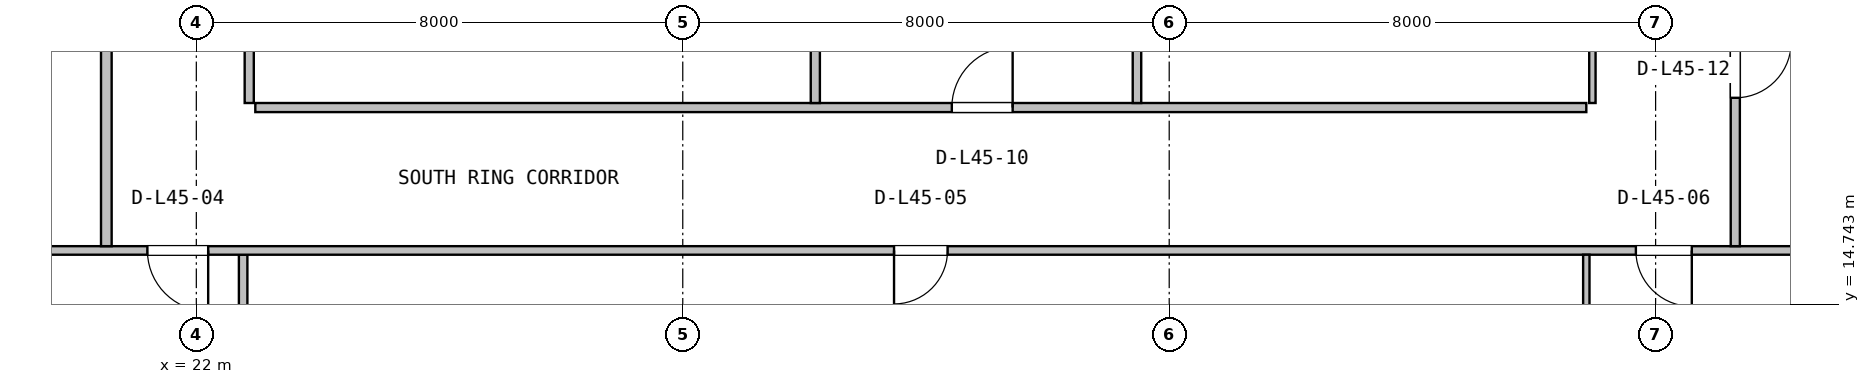
"""IFC4 building model, lengths in metres.
Left out: names, types, materials, properties, quantities, classifications, styles, units other than length and angle.
Written with IfcOpenShell. Run it as: python <this file> out.ifc"""

import sys

from ifc_helpers import new_model, si_unit, direction, frame, frame_2d, origin, place, context, subcontext, project, spatial, rectangle, extrude, source, transform, mapped, element, fill, save


model = new_model("IFC4")
c1 = context("Model", 3, precision=1e-05, world=origin(), true_north=direction((0.0, 1.0)))
c2 = subcontext(c1, "Body", "Model", "MODEL_VIEW")
j1 = project(units=[si_unit("LENGTHUNIT", "METRE"), si_unit("PLANEANGLEUNIT", "RADIAN")], contexts=[c1])
p1 = place(None, origin())
s1 = spatial("IfcSite", under=j1, at=p1, CompositionType="ELEMENT")
p2 = place(p1, origin())
s2 = spatial("IfcBuilding", under=s1, at=p2, CompositionType="ELEMENT")
p3 = place(p2, frame((0.0, 0.0, 183.8)))
s3 = spatial("IfcBuildingStorey", under=s2, at=p3, CompositionType="ELEMENT", Elevation=183.8)
p4 = place(p3, frame((22.77, 7.38, 0.0), z_axis=(0.0, 0.0, 1.0), x_axis=(0.0, 1.0, 0.0)))
e1 = element("IfcWall", 1, at=p4, inside=s3, PredefinedType="PARTITIONING", context=c2, shape_type="SweptSolid", body=[
    extrude(rectangle(XDim=8.18, YDim=0.14, at=frame_2d((4.09, 0.0))), origin(), (0.0, 0.0, 1.0), 3.108),
])
p5 = place(p3, frame((7.18, 15.63, 0.0), z_axis=(0.0, 0.0, 1.0), x_axis=(1.0, 0.0, 0.0)))
e2 = element("IfcWall", 2, at=p5, inside=s3, PredefinedType="PARTITIONING", context=c2, shape_type="SweptSolid", body=[
    extrude(rectangle(XDim=53.64, YDim=0.14, at=frame_2d((26.82, 0.0))), origin(), (0.0, 0.0, 1.0), 2.909),
])
p6 = place(p5, frame((14.015, 0.0, 0.0)))
e3 = element("IfcOpeningElement", 3, at=p6, cuts=e2, PredefinedType="OPENING", context=c2, shape_type="SweptSolid", body=[
    extrude(rectangle(XDim=1.0, YDim=2.1, at=frame_2d((0.5, 1.05))), frame((0.0, 0.08, 0.0), z_axis=(0.0, -1.0, 0.0), x_axis=(1.0, 0.0, 0.0)), (0.0, 0.0, 1.0), 0.16),
])
p7 = place(p5, frame((26.295, 0.0, 0.0)))
e4 = element("IfcOpeningElement", 4, at=p7, cuts=e2, PredefinedType="OPENING", context=c2, shape_type="SweptSolid", body=[
    extrude(rectangle(XDim=0.88, YDim=2.06, at=frame_2d((0.44, 1.03))), frame((0.0, 0.08, 0.0), z_axis=(0.0, -1.0, 0.0), x_axis=(1.0, 0.0, 0.0)), (0.0, 0.0, 1.0), 0.16),
])
p8 = place(p5, frame((38.495, 0.0, 0.0)))
e5 = element("IfcOpeningElement", 5, at=p8, cuts=e2, PredefinedType="OPENING", context=c2, shape_type="SweptSolid", body=[
    extrude(rectangle(XDim=0.92, YDim=2.08, at=frame_2d((0.46, 1.04))), frame((0.0, 0.08, 0.0), z_axis=(0.0, -1.0, 0.0), x_axis=(1.0, 0.0, 0.0)), (0.0, 0.0, 1.0), 0.16),
])
p9 = place(p3, frame((44.86, 7.38, 0.0), z_axis=(0.0, 0.0, 1.0), x_axis=(0.0, 1.0, 0.0)))
e6 = element("IfcWall", 6, at=p9, inside=s3, PredefinedType="PARTITIONING", context=c2, shape_type="SweptSolid", body=[
    extrude(rectangle(XDim=8.18, YDim=0.105, at=frame_2d((4.09, 0.0))), origin(), (0.0, 0.0, 1.0), 3.108),
])
p10 = place(p3, frame((20.52, 15.7, 0.0), z_axis=(0.0, 0.0, 1.0), x_axis=(0.0, 1.0, 0.0)))
e7 = element("IfcWall", 7, at=p10, inside=s3, PredefinedType="PARTITIONING", context=c2, shape_type="SweptSolid", body=[
    extrude(rectangle(XDim=17.575, YDim=0.175, at=frame_2d((8.788, 0.0))), origin(), (0.0, 0.0, 1.0), 3.222),
])
p11 = place(p10, frame((8.265, 0.0, 0.0)))
e8 = element("IfcOpeningElement", 8, at=p11, cuts=e7, PredefinedType="OPENING", context=c2, shape_type="SweptSolid", body=[
    extrude(rectangle(XDim=1.05, YDim=2.1, at=frame_2d((0.525, 1.05))), frame((0.0, 0.098, 0.0), z_axis=(0.0, -1.0, 0.0), x_axis=(1.0, 0.0, 0.0)), (0.0, 0.0, 1.0), 0.195),
])
p12 = place(p3, frame((22.97, 17.98, 0.0), z_axis=(0.0, 0.0, 1.0), x_axis=(1.0, 0.0, 0.0)))
e9 = element("IfcWall", 9, at=p12, inside=s3, PredefinedType="PARTITIONING", context=c2, shape_type="SweptSolid", body=[
    extrude(rectangle(XDim=21.89, YDim=0.15, at=frame_2d((10.945, 0.0))), origin(), (0.0, 0.0, 1.0), 2.909),
])
p13 = place(p12, frame((11.455, 0.0, 0.0)))
e10 = element("IfcOpeningElement", 10, at=p13, cuts=e9, PredefinedType="OPENING", context=c2, shape_type="SweptSolid", body=[
    extrude(rectangle(XDim=1.0, YDim=2.1, at=frame_2d((0.5, 1.05))), frame((0.0, 0.085, 0.0), z_axis=(0.0, -1.0, 0.0), x_axis=(1.0, 0.0, 0.0)), (0.0, 0.0, 1.0), 0.17),
])
p14 = place(p3, frame((32.18, 18.055, 0.0), z_axis=(0.0, 0.0, 1.0), x_axis=(0.0, 1.0, 0.0)))
e11 = element("IfcWall", 11, at=p14, inside=s3, PredefinedType="PARTITIONING", context=c2, shape_type="SweptSolid", body=[
    extrude(rectangle(XDim=15.22, YDim=0.15, at=frame_2d((7.61, 0.0))), origin(), (0.0, 0.0, 1.0), 2.909),
])
p15 = place(p3, frame((22.87, 18.055, 0.0), z_axis=(0.0, 0.0, 1.0), x_axis=(0.0, 1.0, 0.0)))
e12 = element("IfcWall", 12, at=p15, inside=s3, PredefinedType="PARTITIONING", context=c2, shape_type="SweptSolid", body=[
    extrude(rectangle(XDim=15.22, YDim=0.15, at=frame_2d((7.61, 0.0))), origin(), (0.0, 0.0, 1.0), 3.222),
])
p16 = place(p15, frame((7.17, 0.0, 0.0)))
e13 = element("IfcOpeningElement", 13, at=p16, cuts=e12, PredefinedType="OPENING", context=c2, shape_type="SweptSolid", body=[
    extrude(rectangle(XDim=0.88, YDim=2.06, at=frame_2d((0.44, 1.03))), frame((0.0, 0.085, 0.0), z_axis=(0.0, -1.0, 0.0), x_axis=(1.0, 0.0, 0.0)), (0.0, 0.0, 1.0), 0.17),
])
p17 = place(p3, frame((37.47, 18.055, 0.0), z_axis=(0.0, 0.0, 1.0), x_axis=(0.0, 1.0, 0.0)))
e14 = element("IfcWall", 14, at=p17, inside=s3, PredefinedType="PARTITIONING", context=c2, shape_type="SweptSolid", body=[
    extrude(rectangle(XDim=15.22, YDim=0.14, at=frame_2d((7.61, 0.0))), origin(), (0.0, 0.0, 1.0), 2.909),
])
p18 = place(p3, frame((44.96, 18.055, 0.0), z_axis=(0.0, 0.0, 1.0), x_axis=(0.0, 1.0, 0.0)))
e15 = element("IfcWall", 15, at=p18, inside=s3, PredefinedType="PARTITIONING", context=c2, shape_type="SweptSolid", body=[
    extrude(rectangle(XDim=15.22, YDim=0.105, at=frame_2d((7.61, 0.0))), origin(), (0.0, 0.0, 1.0), 3.222),
])
p19 = place(p18, frame((7.17, 0.0, 0.0)))
e16 = element("IfcOpeningElement", 16, at=p19, cuts=e15, PredefinedType="OPENING", context=c2, shape_type="SweptSolid", body=[
    extrude(rectangle(XDim=0.88, YDim=2.06, at=frame_2d((0.44, 1.03))), frame((0.0, 0.062, 0.0), z_axis=(0.0, -1.0, 0.0), x_axis=(1.0, 0.0, 0.0)), (0.0, 0.0, 1.0), 0.125),
])
p20 = place(p3, frame((47.31, 15.7, 0.0), z_axis=(0.0, 0.0, 1.0), x_axis=(0.0, 1.0, 0.0)))
e17 = element("IfcWall", 17, at=p20, inside=s3, PredefinedType="PARTITIONING", context=c2, shape_type="SweptSolid", body=[
    extrude(rectangle(XDim=17.563, YDim=0.15, at=frame_2d((8.781, 0.0))), origin(), (0.0, 0.0, 1.0), 3.222),
])
p21 = place(p20, frame((2.44, 0.0, 0.0)))
e18 = element("IfcOpeningElement", 18, at=p21, cuts=e17, PredefinedType="OPENING", context=c2, shape_type="SweptSolid", body=[
    extrude(rectangle(XDim=0.92, YDim=2.08, at=frame_2d((0.46, 1.04))), frame((0.0, 0.085, 0.0), z_axis=(0.0, -1.0, 0.0), x_axis=(1.0, 0.0, 0.0)), (0.0, 0.0, 1.0), 0.17),
])
p22 = place(p20, frame((9.195, 0.0, 0.0)))
e19 = element("IfcOpeningElement", 19, at=p22, cuts=e17, PredefinedType="OPENING", context=c2, shape_type="SweptSolid", body=[
    extrude(rectangle(XDim=0.92, YDim=2.08, at=frame_2d((0.46, 1.04))), frame((0.0, 0.085, 0.0), z_axis=(0.0, -1.0, 0.0), x_axis=(1.0, 0.0, 0.0)), (0.0, 0.0, 1.0), 0.17),
])
m1 = source(origin(), c2, "Body", "SweptSolid", [
    extrude(rectangle(XDim=1.0, YDim=2.1, at=frame_2d((0.5, 1.05))), frame((0.0, 0.025, 0.0), z_axis=(0.0, -1.0, 0.0), x_axis=(1.0, 0.0, 0.0)), (0.0, 0.0, 1.0), 0.05),
])
p23 = place(p6, frame((1.0, 0.0, 0.0), z_axis=(0.0, 0.0, 1.0), x_axis=(-1.0, 0.0, 0.0)))
e20 = element("IfcDoor", 20, at=p23, inside=s3, OperationType="SINGLE_SWING_RIGHT", PredefinedType="DOOR", context=c2, shape_type="MappedRepresentation", body=[
    mapped(m1, transform((0.0, 0.0, 0.0), x_axis=(1.0, 0.0, 0.0), y_axis=(0.0, 1.0, 0.0), z_axis=(0.0, 0.0, 1.0), scale=1.0)),
])
fill(e3, e20)
m2 = source(origin(), c2, "Body", "SweptSolid", [
    extrude(rectangle(XDim=0.88, YDim=2.06, at=frame_2d((0.44, 1.03))), frame((0.0, 0.025, 0.0), z_axis=(0.0, -1.0, 0.0), x_axis=(1.0, 0.0, 0.0)), (0.0, 0.0, 1.0), 0.05),
])
p24 = place(p7, frame((0.88, 0.0, 0.0), z_axis=(0.0, 0.0, 1.0), x_axis=(-1.0, 0.0, 0.0)))
e21 = element("IfcDoor", 21, at=p24, inside=s3, OperationType="SINGLE_SWING_LEFT", PredefinedType="DOOR", context=c2, shape_type="MappedRepresentation", body=[
    mapped(m2, transform((0.0, 0.0, 0.0), x_axis=(1.0, 0.0, 0.0), y_axis=(0.0, 1.0, 0.0), z_axis=(0.0, 0.0, 1.0), scale=1.0)),
])
fill(e4, e21)
m3 = source(origin(), c2, "Body", "SweptSolid", [
    extrude(rectangle(XDim=0.92, YDim=2.08, at=frame_2d((0.46, 1.04))), frame((0.0, 0.025, 0.0), z_axis=(0.0, -1.0, 0.0), x_axis=(1.0, 0.0, 0.0)), (0.0, 0.0, 1.0), 0.05),
])
p25 = place(p8, frame((0.92, 0.0, 0.0), z_axis=(0.0, 0.0, 1.0), x_axis=(-1.0, 0.0, 0.0)))
e22 = element("IfcDoor", 22, at=p25, inside=s3, OperationType="SINGLE_SWING_RIGHT", PredefinedType="DOOR", context=c2, shape_type="MappedRepresentation", body=[
    mapped(m3, transform((0.0, 0.0, 0.0), x_axis=(1.0, 0.0, 0.0), y_axis=(0.0, 1.0, 0.0), z_axis=(0.0, 0.0, 1.0), scale=1.0)),
])
fill(e5, e22)
p26 = place(p13, origin())
e23 = element("IfcDoor", 23, at=p26, inside=s3, OperationType="SINGLE_SWING_RIGHT", PredefinedType="DOOR", context=c2, shape_type="MappedRepresentation", body=[
    mapped(m1, transform((0.0, 0.0, 0.0), x_axis=(1.0, 0.0, 0.0), y_axis=(0.0, 1.0, 0.0), z_axis=(0.0, 0.0, 1.0), scale=1.0)),
])
fill(e10, e23)
p27 = place(p21, frame((0.92, 0.0, 0.0), z_axis=(0.0, 0.0, 1.0), x_axis=(-1.0, 0.0, 0.0)))
e24 = element("IfcDoor", 24, at=p27, inside=s3, OperationType="SINGLE_SWING_RIGHT", PredefinedType="DOOR", context=c2, shape_type="MappedRepresentation", body=[
    mapped(m3, transform((0.0, 0.0, 0.0), x_axis=(1.0, 0.0, 0.0), y_axis=(0.0, 1.0, 0.0), z_axis=(0.0, 0.0, 1.0), scale=1.0)),
])
fill(e18, e24)
save(model, sys.argv[1])
